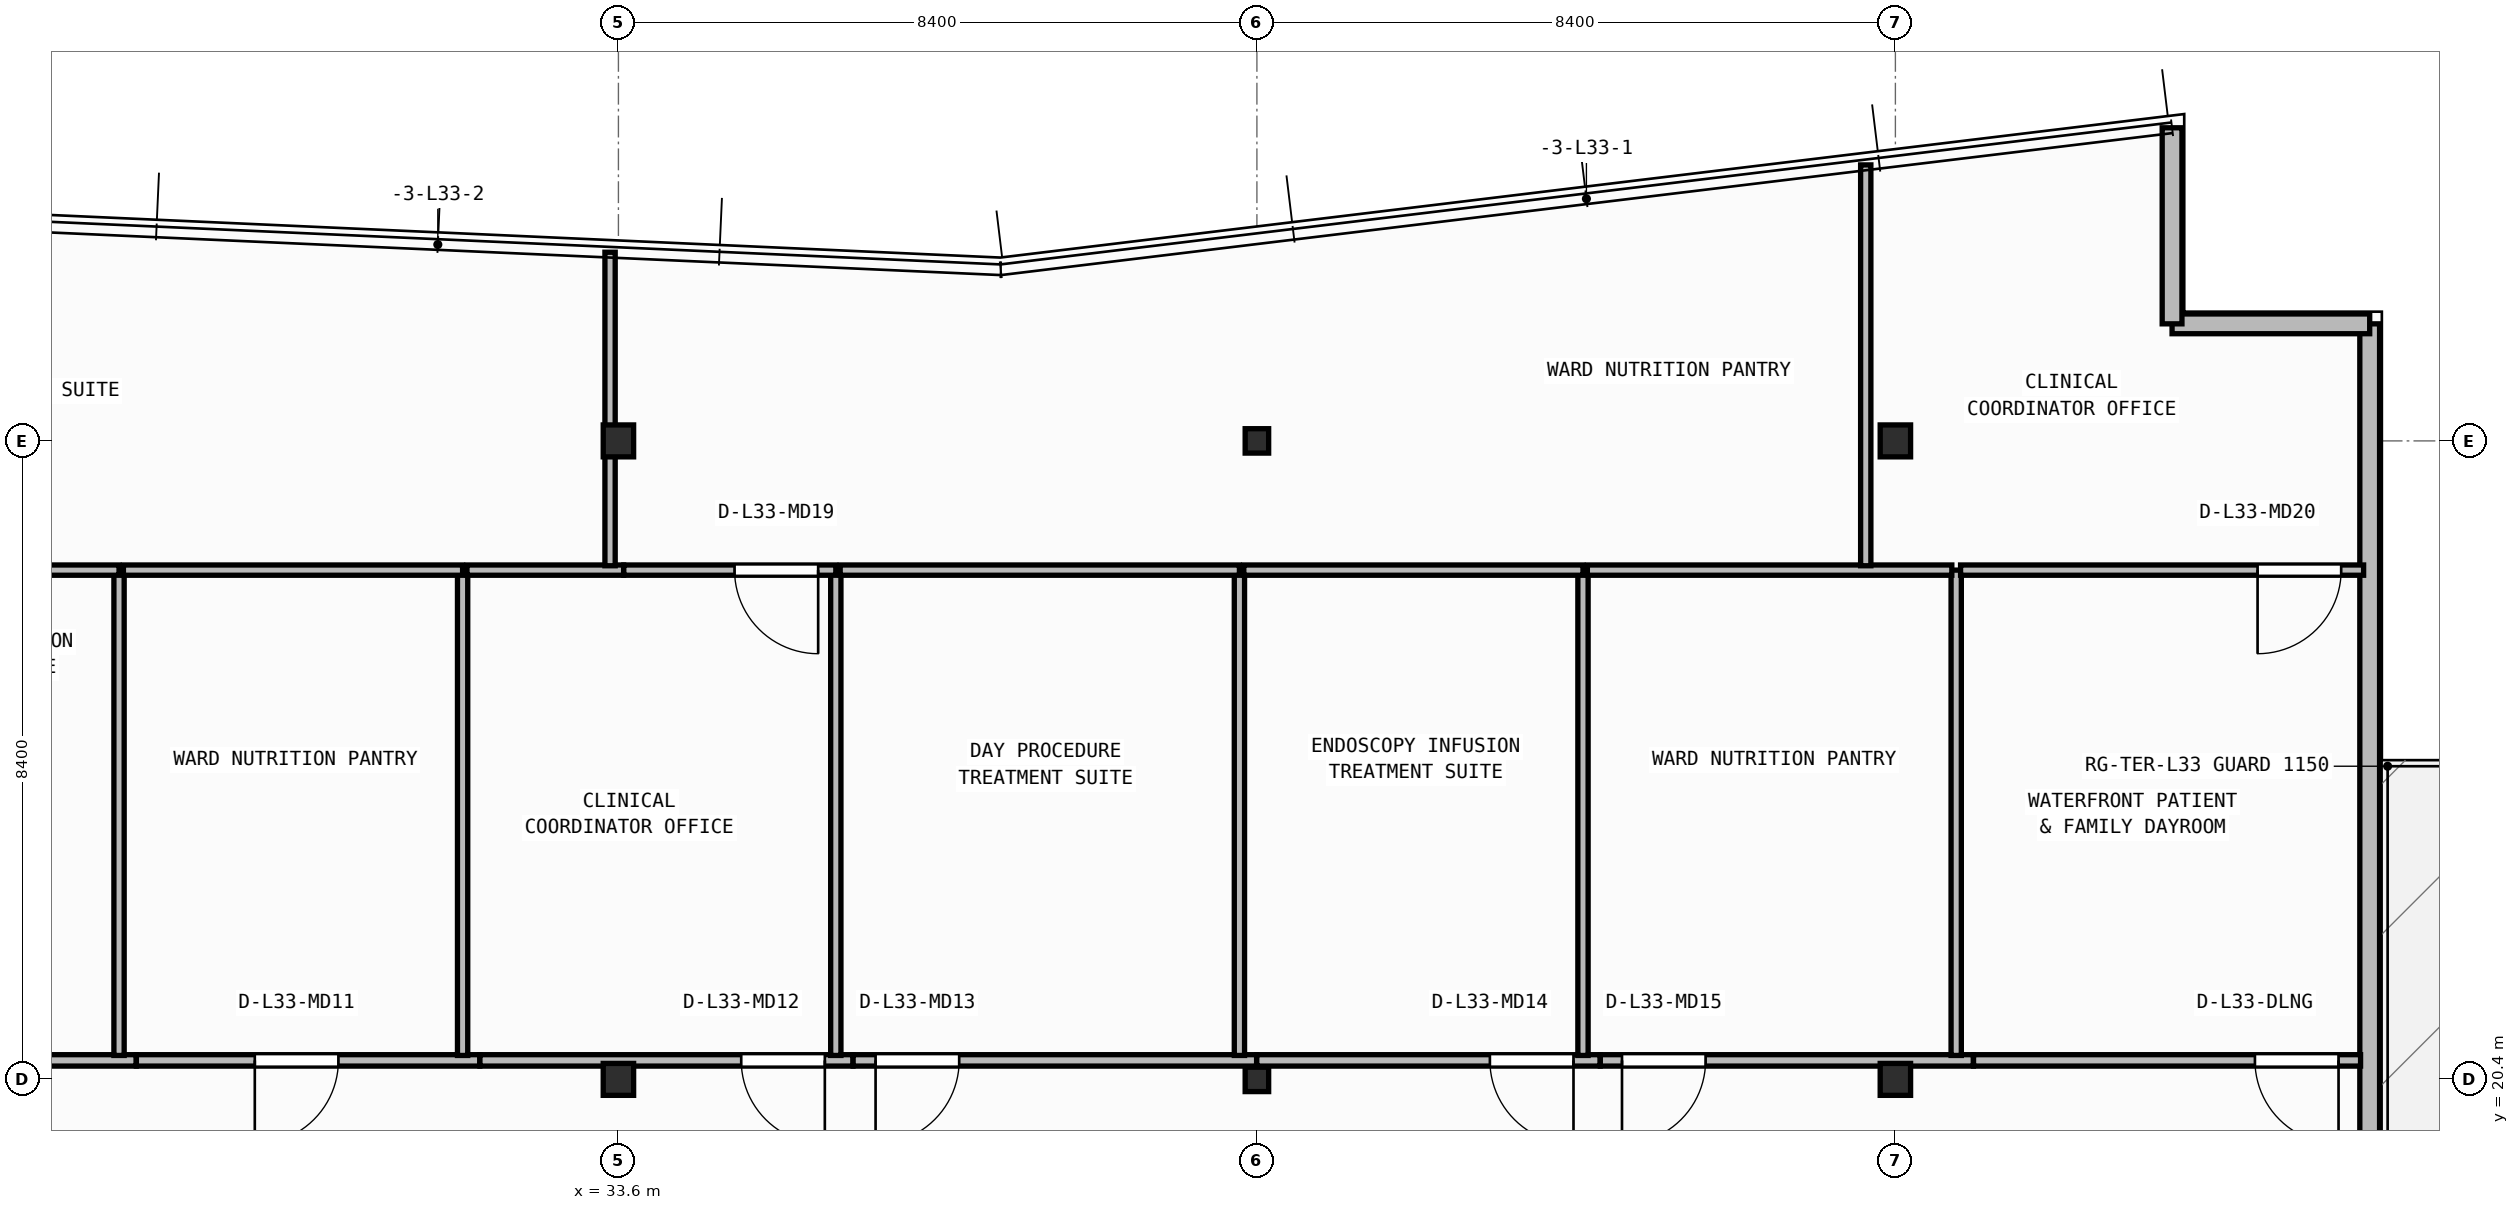
"""IFC4 building model, lengths in metres.
Left out: names, types, materials, properties, quantities, classifications, styles, units other than length and angle.
Written with IfcOpenShell. Run it as: python <this file> out.ifc"""

import sys

from ifc_helpers import new_model, si_unit, direction, frame, frame_2d, origin, origin_2d, place, context, subcontext, project, spatial, rectangle, i_section, extrude, element, fill, save


model = new_model("IFC4")
c1 = context("Model", 3, precision=1e-05, world=origin(), true_north=direction((0.0, 1.0)))
c2 = subcontext(c1, "Body", "Model", "MODEL_VIEW")
j1 = project(units=[si_unit("LENGTHUNIT", "METRE"), si_unit("PLANEANGLEUNIT", "RADIAN")], contexts=[c1])
p1 = place(None, origin())
s1 = spatial("IfcSite", under=j1, at=p1, CompositionType="ELEMENT")
p2 = place(p1, origin())
s2 = spatial("IfcBuilding", under=s1, at=p2, CompositionType="ELEMENT")
p3 = place(p2, frame((0.0, 0.0, 134.95)))
s3 = spatial("IfcBuildingStorey", under=s2, at=p3, CompositionType="ELEMENT", Elevation=134.95)
p4 = place(p3, frame((33.6, 20.4, 0.0), z_axis=(0.0, 0.0, 1.0), x_axis=(1.0, 0.0, 0.0)))
e1 = element("IfcColumn", 1, at=p4, inside=s3, PredefinedType="COLUMN", context=c2, shape_type="SweptSolid", body=[
    extrude(i_section(OverallWidth=0.4, OverallDepth=0.42, WebThickness=0.025, FlangeThickness=0.04, at=origin_2d()), origin(), (0.0, 0.0, 1.0), 3.95),
])
p5 = place(p3, frame((42.0, 20.4, 0.0), z_axis=(0.0, 0.0, 1.0), x_axis=(1.0, 0.0, 0.0)))
e2 = element("IfcColumn", 2, at=p5, inside=s3, PredefinedType="COLUMN", context=c2, shape_type="SweptSolid", body=[
    extrude(i_section(OverallWidth=0.309, OverallDepth=0.321, WebThickness=0.014, FlangeThickness=0.022, FilletRadius=0.017, at=origin_2d()), origin(), (0.0, 0.0, 1.0), 3.95),
])
for number, where, z_axis, x_axis in (
    (3, (50.4, 20.4, 0.0), (0.0, 0.0, 1.0), (1.0, 0.0, 0.0)),
    (4, (33.6, 28.8, 0.0), (0.0, 0.0, 1.0), (1.0, 0.0, 0.0)),
):
    element("IfcColumn", number, at=place(p3, frame(where, z_axis=z_axis, x_axis=x_axis)), inside=s3, PredefinedType="COLUMN", context=c2, shape_type="SweptSolid", body=[
        extrude(i_section(OverallWidth=0.4, OverallDepth=0.42, WebThickness=0.025, FlangeThickness=0.04, at=origin_2d()), origin(), (0.0, 0.0, 1.0), 3.95),
    ])
p6 = place(p3, frame((42.0, 28.8, 0.0), z_axis=(0.0, 0.0, 1.0), x_axis=(1.0, 0.0, 0.0)))
e5 = element("IfcColumn", 5, at=p6, inside=s3, PredefinedType="COLUMN", context=c2, shape_type="SweptSolid", body=[
    extrude(i_section(OverallWidth=0.309, OverallDepth=0.321, WebThickness=0.014, FlangeThickness=0.022, FilletRadius=0.017, at=origin_2d()), origin(), (0.0, 0.0, 1.0), 3.95),
])
p7 = place(p3, frame((50.4, 28.8, 0.0), z_axis=(0.0, 0.0, 1.0), x_axis=(1.0, 0.0, 0.0)))
e6 = element("IfcColumn", 6, at=p7, inside=s3, PredefinedType="COLUMN", context=c2, shape_type="SweptSolid", body=[
    extrude(i_section(OverallWidth=0.4, OverallDepth=0.42, WebThickness=0.025, FlangeThickness=0.04, at=origin_2d()), origin(), (0.0, 0.0, 1.0), 3.95),
])
p8 = place(p3, frame((56.64, 6.86, 0.0), z_axis=(0.0, 0.0, 1.0), x_axis=(0.0, 1.0, 0.0)))
e7 = element("IfcWall", 7, at=p8, inside=s3, PredefinedType="STANDARD", context=c2, shape_type="SweptSolid", body=[
    extrude(rectangle(XDim=23.48, YDim=0.26, at=frame_2d((11.74, 0.0))), origin(), (0.0, 0.0, 1.0), 3.71),
])
p9 = place(p8, frame((9.24, 0.0, 0.0)))
e8 = element("IfcOpeningElement", 8, at=p9, cuts=e7, PredefinedType="OPENING", context=c2, shape_type="SweptSolid", body=[
    extrude(rectangle(XDim=1.3, YDim=2.15, at=frame_2d((0.65, 1.075))), frame((0.0, 0.14, 0.0), z_axis=(0.0, -1.0, 0.0), x_axis=(1.0, 0.0, 0.0)), (0.0, 0.0, 1.0), 0.28),
])
p10 = place(p3, frame((56.64, 30.34, 0.0), z_axis=(0.0, 0.0, 1.0), x_axis=(-1.0, 0.0, 0.0)))
e9 = element("IfcWall", 9, at=p10, inside=s3, PredefinedType="STANDARD", context=c2, shape_type="SweptSolid", body=[
    extrude(rectangle(XDim=2.6, YDim=0.26, at=frame_2d((1.3, 0.0))), origin(), (0.0, 0.0, 1.0), 3.71),
])
p11 = place(p3, frame((54.04, 30.34, 0.0), z_axis=(0.0, 0.0, 1.0), x_axis=(0.0, 1.0, 0.0)))
e10 = element("IfcWall", 10, at=p11, inside=s3, PredefinedType="STANDARD", context=c2, shape_type="SweptSolid", body=[
    extrude(rectangle(XDim=2.579, YDim=0.26, at=frame_2d((1.29, 0.0))), origin(), (0.0, 0.0, 1.0), 3.71),
])
p12 = place(p3, frame((27.256, 20.65, 0.0), z_axis=(0.0, 0.0, 1.0), x_axis=(-1.0, 0.0, 0.0)))
e11 = element("IfcWall", 11, at=p12, inside=s3, PredefinedType="PARTITIONING", context=c2, shape_type="SweptSolid", body=[
    extrude(rectangle(XDim=5.536, YDim=0.15, at=frame_2d((2.768, 0.0))), origin(), (0.0, 0.0, 1.0), 3.083),
])
p13 = place(p3, frame((31.776, 20.65, 0.0), z_axis=(0.0, 0.0, 1.0), x_axis=(-1.0, 0.0, 0.0)))
e12 = element("IfcWall", 12, at=p13, inside=s3, PredefinedType="PARTITIONING", context=c2, shape_type="SweptSolid", body=[
    extrude(rectangle(XDim=4.518, YDim=0.15, at=frame_2d((2.259, 0.0))), origin(), (0.0, 0.0, 1.0), 3.083),
])
p14 = place(p13, frame((1.86, 0.0, 0.0)))
e13 = element("IfcOpeningElement", 13, at=p14, cuts=e12, PredefinedType="OPENING", context=c2, shape_type="SweptSolid", body=[
    extrude(rectangle(XDim=1.1, YDim=2.1, at=frame_2d((0.55, 1.05))), frame((0.0, 0.085, 0.0), z_axis=(0.0, -1.0, 0.0), x_axis=(1.0, 0.0, 0.0)), (0.0, 0.0, 1.0), 0.17),
])
p15 = place(p3, frame((36.686, 20.65, 0.0), z_axis=(0.0, 0.0, 1.0), x_axis=(-1.0, 0.0, 0.0)))
e14 = element("IfcWall", 14, at=p15, inside=s3, PredefinedType="PARTITIONING", context=c2, shape_type="SweptSolid", body=[
    extrude(rectangle(XDim=4.908, YDim=0.15, at=frame_2d((2.454, 0.0))), origin(), (0.0, 0.0, 1.0), 3.083),
])
p16 = place(p15, frame((0.37, 0.0, 0.0)))
e15 = element("IfcOpeningElement", 15, at=p16, cuts=e14, PredefinedType="OPENING", context=c2, shape_type="SweptSolid", body=[
    extrude(rectangle(XDim=1.1, YDim=2.1, at=frame_2d((0.55, 1.05))), frame((0.0, 0.085, 0.0), z_axis=(0.0, -1.0, 0.0), x_axis=(1.0, 0.0, 0.0)), (0.0, 0.0, 1.0), 0.17),
])
p17 = place(p3, frame((41.996, 20.65, 0.0), z_axis=(0.0, 0.0, 1.0), x_axis=(-1.0, 0.0, 0.0)))
e16 = element("IfcWall", 16, at=p17, inside=s3, PredefinedType="PARTITIONING", context=c2, shape_type="SweptSolid", body=[
    extrude(rectangle(XDim=5.308, YDim=0.15, at=frame_2d((2.654, 0.0))), origin(), (0.0, 0.0, 1.0), 3.083),
])
p18 = place(p17, frame((3.913, 0.0, 0.0)))
e17 = element("IfcOpeningElement", 17, at=p18, cuts=e16, PredefinedType="OPENING", context=c2, shape_type="SweptSolid", body=[
    extrude(rectangle(XDim=1.1, YDim=2.1, at=frame_2d((0.55, 1.05))), frame((0.0, 0.085, 0.0), z_axis=(0.0, -1.0, 0.0), x_axis=(1.0, 0.0, 0.0)), (0.0, 0.0, 1.0), 0.17),
])
p19 = place(p3, frame((46.516, 20.65, 0.0), z_axis=(0.0, 0.0, 1.0), x_axis=(-1.0, 0.0, 0.0)))
e18 = element("IfcWall", 18, at=p19, inside=s3, PredefinedType="PARTITIONING", context=c2, shape_type="SweptSolid", body=[
    extrude(rectangle(XDim=4.518, YDim=0.15, at=frame_2d((2.259, 0.0))), origin(), (0.0, 0.0, 1.0), 3.083),
])
p20 = place(p19, frame((0.351, 0.0, 0.0)))
e19 = element("IfcOpeningElement", 19, at=p20, cuts=e18, PredefinedType="OPENING", context=c2, shape_type="SweptSolid", body=[
    extrude(rectangle(XDim=1.1, YDim=2.1, at=frame_2d((0.55, 1.05))), frame((0.0, 0.085, 0.0), z_axis=(0.0, -1.0, 0.0), x_axis=(1.0, 0.0, 0.0)), (0.0, 0.0, 1.0), 0.17),
])
p21 = place(p3, frame((51.426, 20.65, 0.0), z_axis=(0.0, 0.0, 1.0), x_axis=(-1.0, 0.0, 0.0)))
e20 = element("IfcWall", 20, at=p21, inside=s3, PredefinedType="PARTITIONING", context=c2, shape_type="SweptSolid", body=[
    extrude(rectangle(XDim=4.908, YDim=0.15, at=frame_2d((2.454, 0.0))), origin(), (0.0, 0.0, 1.0), 3.083),
])
p22 = place(p21, frame((3.523, 0.0, 0.0)))
e21 = element("IfcOpeningElement", 21, at=p22, cuts=e20, PredefinedType="OPENING", context=c2, shape_type="SweptSolid", body=[
    extrude(rectangle(XDim=1.1, YDim=2.1, at=frame_2d((0.55, 1.05))), frame((0.0, 0.085, 0.0), z_axis=(0.0, -1.0, 0.0), x_axis=(1.0, 0.0, 0.0)), (0.0, 0.0, 1.0), 0.17),
])
p23 = place(p3, frame((56.52, 20.65, 0.0), z_axis=(0.0, 0.0, 1.0), x_axis=(-1.0, 0.0, 0.0)))
e22 = element("IfcWall", 22, at=p23, inside=s3, PredefinedType="PARTITIONING", context=c2, shape_type="SweptSolid", body=[
    extrude(rectangle(XDim=5.092, YDim=0.15, at=frame_2d((2.546, 0.0))), origin(), (0.0, 0.0, 1.0), 3.71),
])
p24 = place(p23, frame((0.29, 0.0, 0.0)))
e23 = element("IfcOpeningElement", 23, at=p24, cuts=e22, PredefinedType="OPENING", context=c2, shape_type="SweptSolid", body=[
    extrude(rectangle(XDim=1.1, YDim=2.1, at=frame_2d((0.55, 1.05))), frame((0.0, 0.085, 0.0), z_axis=(0.0, -1.0, 0.0), x_axis=(1.0, 0.0, 0.0)), (0.0, 0.0, 1.0), 0.17),
])
p25 = place(p3, frame((27.03, 20.715, 0.0), z_axis=(0.0, 0.0, 1.0), x_axis=(0.0, 1.0, 0.0)))
e24 = element("IfcWall", 24, at=p25, inside=s3, PredefinedType="PARTITIONING", context=c2, shape_type="SweptSolid", body=[
    extrude(rectangle(XDim=6.385, YDim=0.135, at=frame_2d((3.192, 0.0))), origin(), (0.0, 0.0, 1.0), 3.71),
])
p26 = place(p3, frame((27.03, 27.1, 0.0), z_axis=(0.0, 0.0, 1.0), x_axis=(-1.0, 0.0, 0.0)))
e25 = element("IfcWall", 25, at=p26, inside=s3, PredefinedType="PARTITIONING", context=c2, shape_type="SweptSolid", body=[
    extrude(rectangle(XDim=5.265, YDim=0.135, at=frame_2d((2.633, 0.0))), origin(), (0.0, 0.0, 1.0), 3.71),
])
p27 = place(p3, frame((31.55, 20.715, 0.0), z_axis=(0.0, 0.0, 1.0), x_axis=(0.0, 1.0, 0.0)))
e26 = element("IfcWall", 26, at=p27, inside=s3, PredefinedType="PARTITIONING", context=c2, shape_type="SweptSolid", body=[
    extrude(rectangle(XDim=6.385, YDim=0.135, at=frame_2d((3.192, 0.0))), origin(), (0.0, 0.0, 1.0), 3.71),
])
p28 = place(p3, frame((31.55, 27.1, 0.0), z_axis=(0.0, 0.0, 1.0), x_axis=(-1.0, 0.0, 0.0)))
e27 = element("IfcWall", 27, at=p28, inside=s3, PredefinedType="PARTITIONING", context=c2, shape_type="SweptSolid", body=[
    extrude(rectangle(XDim=4.463, YDim=0.135, at=frame_2d((2.231, 0.0))), origin(), (0.0, 0.0, 1.0), 3.71),
])
p29 = place(p3, frame((36.46, 20.715, 0.0), z_axis=(0.0, 0.0, 1.0), x_axis=(0.0, 1.0, 0.0)))
e28 = element("IfcWall", 28, at=p29, inside=s3, PredefinedType="PARTITIONING", context=c2, shape_type="SweptSolid", body=[
    extrude(rectangle(XDim=6.385, YDim=0.135, at=frame_2d((3.192, 0.0))), origin(), (0.0, 0.0, 1.0), 3.71),
])
p30 = place(p3, frame((33.668, 27.1, 0.0), z_axis=(0.0, 0.0, 1.0), x_axis=(-1.0, 0.0, 0.0)))
e29 = element("IfcWall", 29, at=p30, inside=s3, PredefinedType="PARTITIONING", context=c2, shape_type="SweptSolid", body=[
    extrude(rectangle(XDim=2.061, YDim=0.135, at=frame_2d((1.031, 0.0))), origin(), (0.0, 0.0, 1.0), 3.71),
])
p31 = place(p3, frame((36.46, 27.1, 0.0), z_axis=(0.0, 0.0, 1.0), x_axis=(-1.0, 0.0, 0.0)))
e30 = element("IfcWall", 30, at=p31, inside=s3, PredefinedType="PARTITIONING", context=c2, shape_type="SweptSolid", body=[
    extrude(rectangle(XDim=2.79, YDim=0.135, at=frame_2d((1.395, 0.0))), origin(), (0.0, 0.0, 1.0), 3.71),
])
p32 = place(p31, frame((0.232, 0.0, 0.0)))
e31 = element("IfcOpeningElement", 31, at=p32, cuts=e30, PredefinedType="OPENING", context=c2, shape_type="SweptSolid", body=[
    extrude(rectangle(XDim=1.1, YDim=2.1, at=frame_2d((0.55, 1.05))), frame((0.0, 0.077, 0.0), z_axis=(0.0, -1.0, 0.0), x_axis=(1.0, 0.0, 0.0)), (0.0, 0.0, 1.0), 0.155),
])
p33 = place(p3, frame((41.77, 20.715, 0.0), z_axis=(0.0, 0.0, 1.0), x_axis=(0.0, 1.0, 0.0)))
e32 = element("IfcWall", 32, at=p33, inside=s3, PredefinedType="PARTITIONING", context=c2, shape_type="SweptSolid", body=[
    extrude(rectangle(XDim=6.385, YDim=0.135, at=frame_2d((3.192, 0.0))), origin(), (0.0, 0.0, 1.0), 3.152),
])
p34 = place(p3, frame((41.77, 27.1, 0.0), z_axis=(0.0, 0.0, 1.0), x_axis=(-1.0, 0.0, 0.0)))
e33 = element("IfcWall", 33, at=p34, inside=s3, PredefinedType="PARTITIONING", context=c2, shape_type="SweptSolid", body=[
    extrude(rectangle(XDim=5.252, YDim=0.135, at=frame_2d((2.626, 0.0))), origin(), (0.0, 0.0, 1.0), 3.71),
])
p35 = place(p3, frame((46.29, 20.715, 0.0), z_axis=(0.0, 0.0, 1.0), x_axis=(0.0, 1.0, 0.0)))
e34 = element("IfcWall", 34, at=p35, inside=s3, PredefinedType="PARTITIONING", context=c2, shape_type="SweptSolid", body=[
    extrude(rectangle(XDim=6.385, YDim=0.135, at=frame_2d((3.192, 0.0))), origin(), (0.0, 0.0, 1.0), 3.71),
])
p36 = place(p3, frame((46.29, 27.1, 0.0), z_axis=(0.0, 0.0, 1.0), x_axis=(-1.0, 0.0, 0.0)))
e35 = element("IfcWall", 35, at=p36, inside=s3, PredefinedType="PARTITIONING", context=c2, shape_type="SweptSolid", body=[
    extrude(rectangle(XDim=4.463, YDim=0.135, at=frame_2d((2.231, 0.0))), origin(), (0.0, 0.0, 1.0), 3.71),
])
p37 = place(p3, frame((51.2, 20.715, 0.0), z_axis=(0.0, 0.0, 1.0), x_axis=(0.0, 1.0, 0.0)))
e36 = element("IfcWall", 36, at=p37, inside=s3, PredefinedType="PARTITIONING", context=c2, shape_type="SweptSolid", body=[
    extrude(rectangle(XDim=6.385, YDim=0.135, at=frame_2d((3.192, 0.0))), origin(), (0.0, 0.0, 1.0), 3.71),
])
p38 = place(p3, frame((51.143, 27.1, 0.0), z_axis=(0.0, 0.0, 1.0), x_axis=(-1.0, 0.0, 0.0)))
e37 = element("IfcWall", 37, at=p38, inside=s3, PredefinedType="PARTITIONING", context=c2, shape_type="SweptSolid", body=[
    extrude(rectangle(XDim=4.795, YDim=0.135, at=frame_2d((2.397, 0.0))), origin(), (0.0, 0.0, 1.0), 3.71),
])
p39 = place(p3, frame((56.56, 27.1, 0.0), z_axis=(0.0, 0.0, 1.0), x_axis=(-1.0, 0.0, 0.0)))
e38 = element("IfcWall", 38, at=p39, inside=s3, PredefinedType="PARTITIONING", context=c2, shape_type="SweptSolid", body=[
    extrude(rectangle(XDim=5.302, YDim=0.135, at=frame_2d((2.651, 0.0))), origin(), (0.0, 0.0, 1.0), 3.71),
])
p40 = place(p39, frame((0.295, 0.0, 0.0)))
e39 = element("IfcOpeningElement", 39, at=p40, cuts=e38, PredefinedType="OPENING", context=c2, shape_type="SweptSolid", body=[
    extrude(rectangle(XDim=1.1, YDim=2.1, at=frame_2d((0.55, 1.05))), frame((0.0, 0.077, 0.0), z_axis=(0.0, -1.0, 0.0), x_axis=(1.0, 0.0, 0.0)), (0.0, 0.0, 1.0), 0.155),
])
p41 = place(p3, frame((33.49, 27.157, 0.0), z_axis=(0.0, 0.0, 1.0), x_axis=(0.0, 1.0, 0.0)))
e40 = element("IfcWall", 40, at=p41, inside=s3, PredefinedType="PARTITIONING", context=c2, shape_type="SweptSolid", body=[
    extrude(rectangle(XDim=4.125, YDim=0.135, at=frame_2d((2.062, 0.0))), origin(), (0.0, 0.0, 1.0), 3.152),
])
p42 = place(p3, frame((50.01, 27.157, 0.0), z_axis=(0.0, 0.0, 1.0), x_axis=(0.0, 1.0, 0.0)))
e41 = element("IfcWall", 41, at=p42, inside=s3, PredefinedType="PARTITIONING", context=c2, shape_type="SweptSolid", body=[
    extrude(rectangle(XDim=5.273, YDim=0.135, at=frame_2d((2.637, 0.0))), origin(), (0.0, 0.0, 1.0), 3.152),
])
p43 = place(p14, origin())
e42 = element("IfcDoor", 42, at=p43, inside=s3, OperationType="SINGLE_SWING_RIGHT", PredefinedType="DOOR", context=c2, shape_type="SweptSolid", body=[
    extrude(rectangle(XDim=1.1, YDim=2.1, at=frame_2d((0.55, 1.05))), frame((0.0, 0.025, 0.0), z_axis=(0.0, -1.0, 0.0), x_axis=(1.0, 0.0, 0.0)), (0.0, 0.0, 1.0), 0.05),
])
fill(e13, e42)
p44 = place(p16, origin())
e43 = element("IfcDoor", 43, at=p44, inside=s3, OperationType="SINGLE_SWING_LEFT", PredefinedType="DOOR", context=c2, shape_type="SweptSolid", body=[
    extrude(rectangle(XDim=1.1, YDim=2.1, at=frame_2d((0.55, 1.05))), frame((0.0, 0.025, 0.0), z_axis=(0.0, -1.0, 0.0), x_axis=(1.0, 0.0, 0.0)), (0.0, 0.0, 1.0), 0.05),
])
fill(e15, e43)
p45 = place(p18, origin())
e44 = element("IfcDoor", 44, at=p45, inside=s3, OperationType="SINGLE_SWING_RIGHT", PredefinedType="DOOR", context=c2, shape_type="SweptSolid", body=[
    extrude(rectangle(XDim=1.1, YDim=2.1, at=frame_2d((0.55, 1.05))), frame((0.0, 0.025, 0.0), z_axis=(0.0, -1.0, 0.0), x_axis=(1.0, 0.0, 0.0)), (0.0, 0.0, 1.0), 0.05),
])
fill(e17, e44)
p46 = place(p20, origin())
e45 = element("IfcDoor", 45, at=p46, inside=s3, OperationType="SINGLE_SWING_LEFT", PredefinedType="DOOR", context=c2, shape_type="SweptSolid", body=[
    extrude(rectangle(XDim=1.1, YDim=2.1, at=frame_2d((0.55, 1.05))), frame((0.0, 0.025, 0.0), z_axis=(0.0, -1.0, 0.0), x_axis=(1.0, 0.0, 0.0)), (0.0, 0.0, 1.0), 0.05),
])
fill(e19, e45)
p47 = place(p22, origin())
e46 = element("IfcDoor", 46, at=p47, inside=s3, OperationType="SINGLE_SWING_RIGHT", PredefinedType="DOOR", context=c2, shape_type="SweptSolid", body=[
    extrude(rectangle(XDim=1.1, YDim=2.1, at=frame_2d((0.55, 1.05))), frame((0.0, 0.025, 0.0), z_axis=(0.0, -1.0, 0.0), x_axis=(1.0, 0.0, 0.0)), (0.0, 0.0, 1.0), 0.05),
])
fill(e21, e46)
p48 = place(p24, origin())
e47 = element("IfcDoor", 47, at=p48, inside=s3, OperationType="SINGLE_SWING_LEFT", PredefinedType="DOOR", context=c2, shape_type="SweptSolid", body=[
    extrude(rectangle(XDim=1.1, YDim=2.1, at=frame_2d((0.55, 1.05))), frame((0.0, 0.025, 0.0), z_axis=(0.0, -1.0, 0.0), x_axis=(1.0, 0.0, 0.0)), (0.0, 0.0, 1.0), 0.05),
])
fill(e23, e47)
p49 = place(p32, origin())
e48 = element("IfcDoor", 48, at=p49, inside=s3, OperationType="SINGLE_SWING_LEFT", PredefinedType="DOOR", context=c2, shape_type="SweptSolid", body=[
    extrude(rectangle(XDim=1.1, YDim=2.1, at=frame_2d((0.55, 1.05))), frame((0.0, 0.025, 0.0), z_axis=(0.0, -1.0, 0.0), x_axis=(1.0, 0.0, 0.0)), (0.0, 0.0, 1.0), 0.05),
])
fill(e31, e48)
p50 = place(p40, origin())
e49 = element("IfcDoor", 49, at=p50, inside=s3, OperationType="SINGLE_SWING_RIGHT", PredefinedType="DOOR", context=c2, shape_type="SweptSolid", body=[
    extrude(rectangle(XDim=1.1, YDim=2.1, at=frame_2d((0.55, 1.05))), frame((0.0, 0.025, 0.0), z_axis=(0.0, -1.0, 0.0), x_axis=(1.0, 0.0, 0.0)), (0.0, 0.0, 1.0), 0.05),
])
fill(e39, e49)
save(model, sys.argv[1])
